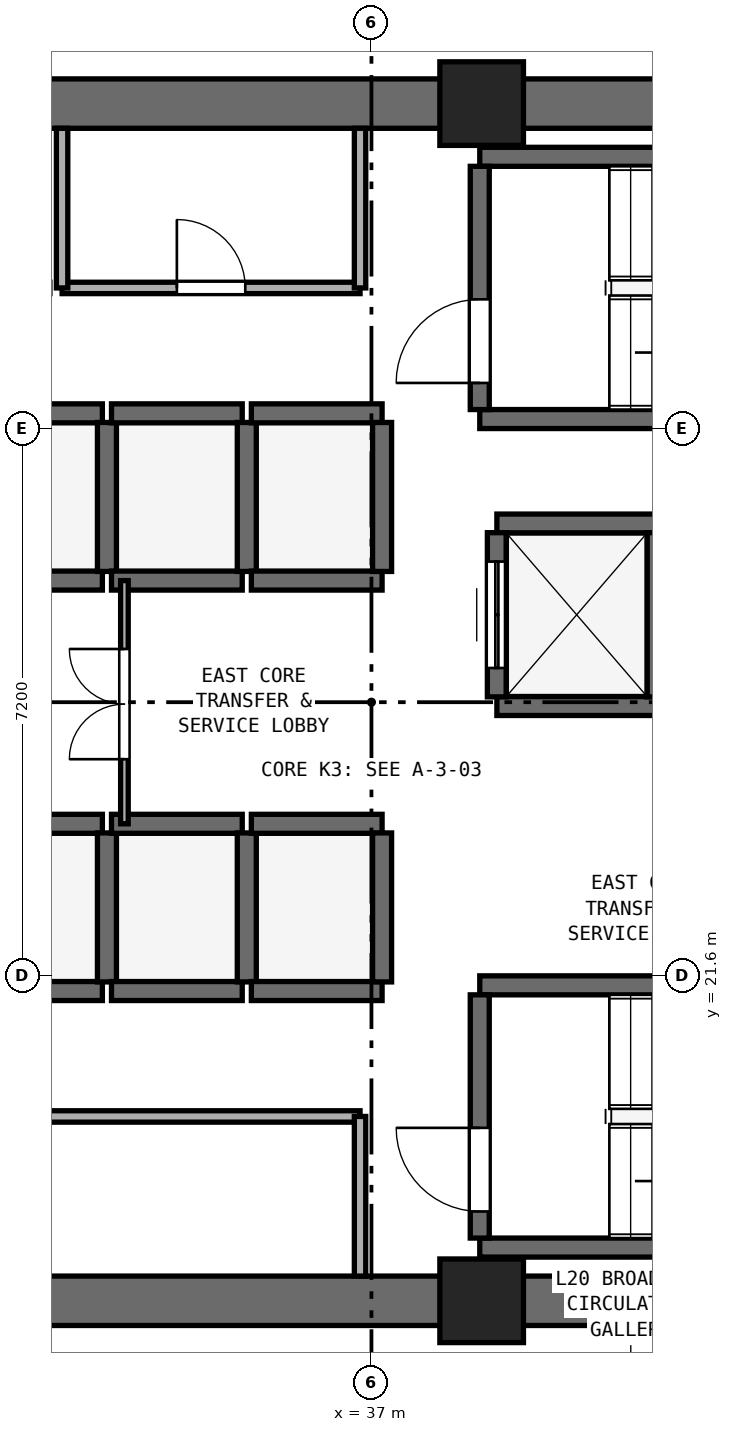
"""IFC4 building model, lengths in metres.
Left out: names, types, materials, properties, quantities, classifications, styles, units other than length and angle.
Written with IfcOpenShell. Run it as: python <this file> out.ifc"""

import sys

from ifc_helpers import new_model, si_unit, direction, frame, frame_2d, origin, origin_2d, place, context, subcontext, project, spatial, rectangle, extrude, element, fill, save


model = new_model("IFC4")
c1 = context("Model", 3, precision=1e-05, world=origin(), true_north=direction((0.0, 1.0)))
c2 = subcontext(c1, "Body", "Model", "MODEL_VIEW")
j1 = project(units=[si_unit("LENGTHUNIT", "METRE"), si_unit("PLANEANGLEUNIT", "RADIAN")], contexts=[c1])
p1 = place(None, origin())
s1 = spatial("IfcSite", under=j1, at=p1, CompositionType="ELEMENT")
p2 = place(p1, origin())
s2 = spatial("IfcBuilding", under=s1, at=p2, CompositionType="ELEMENT")
p3 = place(p2, frame((0.0, 0.0, 82.0)))
s3 = spatial("IfcBuildingStorey", under=s2, at=p3, CompositionType="ELEMENT", Elevation=82.0)
for number, where, z_axis, x_axis in (
    (1, (25.4, 17.325, 0.0), (0.0, 0.0, 1.0), (1.0, 0.0, 0.0)),
    (2, (25.4, 33.075, 0.0), (0.0, 0.0, 1.0), (1.0, 0.0, 0.0)),
):
    element("IfcWall", number, at=place(p3, frame(where, z_axis=z_axis, x_axis=x_axis)), inside=s3, PredefinedType="SHEAR", context=c2, shape_type="SweptSolid", body=[
        extrude(rectangle(XDim=23.2, YDim=0.65, at=frame_2d((11.6, 0.0))), origin(), (0.0, 0.0, 1.0), 3.525),
    ])
for number, where, z_axis, x_axis in (
    (3, (38.45, 17.325, 0.0), (0.0, 0.0, 1.0), (1.0, 0.0, 0.0)),
    (4, (38.45, 33.075, 0.0), (0.0, 0.0, 1.0), (1.0, 0.0, 0.0)),
):
    element("IfcColumn", number, at=place(p3, frame(where, z_axis=z_axis, x_axis=x_axis)), inside=s3, PredefinedType="PILASTER", context=c2, shape_type="SweptSolid", body=[
        extrude(rectangle(XDim=1.1, YDim=1.1, at=origin_2d()), origin(), (0.0, 0.0, 1.0), 3.8),
    ])
for number, where, z_axis, x_axis in (
    (5, (38.425, 28.925, 0.0), (0.0, 0.0, 1.0), (1.0, 0.0, 0.0)),
    (6, (38.425, 32.375, 0.0), (0.0, 0.0, 1.0), (1.0, 0.0, 0.0)),
):
    element("IfcWall", number, at=place(p3, frame(where, z_axis=z_axis, x_axis=x_axis)), inside=s3, PredefinedType="SHEAR", context=c2, shape_type="SweptSolid", body=[
        extrude(rectangle(XDim=7.3, YDim=0.25, at=frame_2d((3.65, 0.0))), origin(), (0.0, 0.0, 1.0), 3.525),
    ])
p4 = place(p3, frame((38.425, 29.05, 0.0), z_axis=(0.0, 0.0, 1.0), x_axis=(0.0, 1.0, 0.0)))
e7 = element("IfcWall", 7, at=p4, inside=s3, PredefinedType="SHEAR", context=c2, shape_type="SweptSolid", body=[
    extrude(rectangle(XDim=3.2, YDim=0.25, at=frame_2d((1.6, 0.0))), origin(), (0.0, 0.0, 1.0), 3.525),
])
p5 = place(p4, frame((0.35, 0.0, 0.0)))
e8 = element("IfcOpeningElement", 8, at=p5, cuts=e7, PredefinedType="OPENING", context=c2, shape_type="SweptSolid", body=[
    extrude(rectangle(XDim=1.1, YDim=2.15, at=frame_2d((0.55, 1.075))), frame((0.0, 0.135, 0.0), z_axis=(0.0, -1.0, 0.0), x_axis=(1.0, 0.0, 0.0)), (0.0, 0.0, 1.0), 0.27),
])
for number, where, z_axis, x_axis in (
    (9, (38.425, 18.025, 0.0), (0.0, 0.0, 1.0), (1.0, 0.0, 0.0)),
    (10, (38.425, 21.475, 0.0), (0.0, 0.0, 1.0), (1.0, 0.0, 0.0)),
):
    element("IfcWall", number, at=place(p3, frame(where, z_axis=z_axis, x_axis=x_axis)), inside=s3, PredefinedType="SHEAR", context=c2, shape_type="SweptSolid", body=[
        extrude(rectangle(XDim=7.3, YDim=0.25, at=frame_2d((3.65, 0.0))), origin(), (0.0, 0.0, 1.0), 3.525),
    ])
p6 = place(p3, frame((38.425, 18.15, 0.0), z_axis=(0.0, 0.0, 1.0), x_axis=(0.0, 1.0, 0.0)))
e11 = element("IfcWall", 11, at=p6, inside=s3, PredefinedType="SHEAR", context=c2, shape_type="SweptSolid", body=[
    extrude(rectangle(XDim=3.2, YDim=0.25, at=frame_2d((1.6, 0.0))), origin(), (0.0, 0.0, 1.0), 3.525),
])
p7 = place(p6, frame((0.35, 0.0, 0.0)))
e12 = element("IfcOpeningElement", 12, at=p7, cuts=e11, PredefinedType="OPENING", context=c2, shape_type="SweptSolid", body=[
    extrude(rectangle(XDim=1.1, YDim=2.15, at=frame_2d((0.55, 1.075))), frame((0.0, 0.135, 0.0), z_axis=(0.0, -1.0, 0.0), x_axis=(1.0, 0.0, 0.0)), (0.0, 0.0, 1.0), 0.27),
])
for number, where, z_axis, x_axis in (
    (13, (31.74, 21.4, 0.0), (0.0, 0.0, 1.0), (1.0, 0.0, 0.0)),
    (14, (31.74, 23.6, 0.0), (0.0, 0.0, 1.0), (1.0, 0.0, 0.0)),
):
    element("IfcWall", number, at=place(p3, frame(where, z_axis=z_axis, x_axis=x_axis)), inside=s3, PredefinedType="SHEAR", context=c2, shape_type="SweptSolid", body=[
        extrude(rectangle(XDim=1.72, YDim=0.25, at=frame_2d((0.86, 0.0))), origin(), (0.0, 0.0, 1.0), 3.525),
    ])
p8 = place(p3, frame((33.52, 21.52, 0.0), z_axis=(0.0, 0.0, 1.0), x_axis=(0.0, 1.0, 0.0)))
e15 = element("IfcWall", 15, at=p8, inside=s3, PredefinedType="SHEAR", context=c2, shape_type="SweptSolid", body=[
    extrude(rectangle(XDim=1.96, YDim=0.25, at=frame_2d((0.98, 0.0))), origin(), (0.0, 0.0, 1.0), 3.525),
])
for number, where, z_axis, x_axis in (
    (16, (33.58, 21.4, 0.0), (0.0, 0.0, 1.0), (1.0, 0.0, 0.0)),
    (17, (33.58, 23.6, 0.0), (0.0, 0.0, 1.0), (1.0, 0.0, 0.0)),
):
    element("IfcWall", number, at=place(p3, frame(where, z_axis=z_axis, x_axis=x_axis)), inside=s3, PredefinedType="SHEAR", context=c2, shape_type="SweptSolid", body=[
        extrude(rectangle(XDim=1.72, YDim=0.25, at=frame_2d((0.86, 0.0))), origin(), (0.0, 0.0, 1.0), 3.525),
    ])
p9 = place(p3, frame((35.36, 21.52, 0.0), z_axis=(0.0, 0.0, 1.0), x_axis=(0.0, 1.0, 0.0)))
e18 = element("IfcWall", 18, at=p9, inside=s3, PredefinedType="SHEAR", context=c2, shape_type="SweptSolid", body=[
    extrude(rectangle(XDim=1.96, YDim=0.25, at=frame_2d((0.98, 0.0))), origin(), (0.0, 0.0, 1.0), 3.525),
])
for number, where, z_axis, x_axis in (
    (19, (35.42, 21.4, 0.0), (0.0, 0.0, 1.0), (1.0, 0.0, 0.0)),
    (20, (35.42, 23.6, 0.0), (0.0, 0.0, 1.0), (1.0, 0.0, 0.0)),
):
    element("IfcWall", number, at=place(p3, frame(where, z_axis=z_axis, x_axis=x_axis)), inside=s3, PredefinedType="SHEAR", context=c2, shape_type="SweptSolid", body=[
        extrude(rectangle(XDim=1.72, YDim=0.25, at=frame_2d((0.86, 0.0))), origin(), (0.0, 0.0, 1.0), 3.525),
    ])
p10 = place(p3, frame((37.14, 21.52, 0.0), z_axis=(0.0, 0.0, 1.0), x_axis=(0.0, 1.0, 0.0)))
e21 = element("IfcWall", 21, at=p10, inside=s3, PredefinedType="SHEAR", context=c2, shape_type="SweptSolid", body=[
    extrude(rectangle(XDim=1.96, YDim=0.25, at=frame_2d((0.98, 0.0))), origin(), (0.0, 0.0, 1.0), 3.525),
])
for number, where, z_axis, x_axis in (
    (22, (31.74, 26.8, 0.0), (0.0, 0.0, 1.0), (1.0, 0.0, 0.0)),
    (23, (31.74, 29.0, 0.0), (0.0, 0.0, 1.0), (1.0, 0.0, 0.0)),
):
    element("IfcWall", number, at=place(p3, frame(where, z_axis=z_axis, x_axis=x_axis)), inside=s3, PredefinedType="SHEAR", context=c2, shape_type="SweptSolid", body=[
        extrude(rectangle(XDim=1.72, YDim=0.25, at=frame_2d((0.86, 0.0))), origin(), (0.0, 0.0, 1.0), 3.525),
    ])
p11 = place(p3, frame((33.52, 26.92, 0.0), z_axis=(0.0, 0.0, 1.0), x_axis=(0.0, 1.0, 0.0)))
e24 = element("IfcWall", 24, at=p11, inside=s3, PredefinedType="SHEAR", context=c2, shape_type="SweptSolid", body=[
    extrude(rectangle(XDim=1.96, YDim=0.25, at=frame_2d((0.98, 0.0))), origin(), (0.0, 0.0, 1.0), 3.525),
])
for number, where, z_axis, x_axis in (
    (25, (33.58, 26.8, 0.0), (0.0, 0.0, 1.0), (1.0, 0.0, 0.0)),
    (26, (33.58, 29.0, 0.0), (0.0, 0.0, 1.0), (1.0, 0.0, 0.0)),
):
    element("IfcWall", number, at=place(p3, frame(where, z_axis=z_axis, x_axis=x_axis)), inside=s3, PredefinedType="SHEAR", context=c2, shape_type="SweptSolid", body=[
        extrude(rectangle(XDim=1.72, YDim=0.25, at=frame_2d((0.86, 0.0))), origin(), (0.0, 0.0, 1.0), 3.525),
    ])
p12 = place(p3, frame((35.36, 26.92, 0.0), z_axis=(0.0, 0.0, 1.0), x_axis=(0.0, 1.0, 0.0)))
e27 = element("IfcWall", 27, at=p12, inside=s3, PredefinedType="SHEAR", context=c2, shape_type="SweptSolid", body=[
    extrude(rectangle(XDim=1.96, YDim=0.25, at=frame_2d((0.98, 0.0))), origin(), (0.0, 0.0, 1.0), 3.525),
])
for number, where, z_axis, x_axis in (
    (28, (35.42, 26.8, 0.0), (0.0, 0.0, 1.0), (1.0, 0.0, 0.0)),
    (29, (35.42, 29.0, 0.0), (0.0, 0.0, 1.0), (1.0, 0.0, 0.0)),
):
    element("IfcWall", number, at=place(p3, frame(where, z_axis=z_axis, x_axis=x_axis)), inside=s3, PredefinedType="SHEAR", context=c2, shape_type="SweptSolid", body=[
        extrude(rectangle(XDim=1.72, YDim=0.25, at=frame_2d((0.86, 0.0))), origin(), (0.0, 0.0, 1.0), 3.525),
    ])
p13 = place(p3, frame((37.14, 26.92, 0.0), z_axis=(0.0, 0.0, 1.0), x_axis=(0.0, 1.0, 0.0)))
e30 = element("IfcWall", 30, at=p13, inside=s3, PredefinedType="SHEAR", context=c2, shape_type="SweptSolid", body=[
    extrude(rectangle(XDim=1.96, YDim=0.25, at=frame_2d((0.98, 0.0))), origin(), (0.0, 0.0, 1.0), 3.525),
])
for number, where, z_axis, x_axis in (
    (31, (38.65, 25.15, 0.0), (0.0, 0.0, 1.0), (1.0, 0.0, 0.0)),
    (32, (38.65, 27.55, 0.0), (0.0, 0.0, 1.0), (1.0, 0.0, 0.0)),
):
    element("IfcWall", number, at=place(p3, frame(where, z_axis=z_axis, x_axis=x_axis)), inside=s3, PredefinedType="SHEAR", context=c2, shape_type="SweptSolid", body=[
        extrude(rectangle(XDim=2.1, YDim=0.25, at=frame_2d((1.05, 0.0))), origin(), (0.0, 0.0, 1.0), 3.525),
    ])
p14 = place(p3, frame((38.65, 25.27, 0.0), z_axis=(0.0, 0.0, 1.0), x_axis=(0.0, 1.0, 0.0)))
e33 = element("IfcWall", 33, at=p14, inside=s3, PredefinedType="SHEAR", context=c2, shape_type="SweptSolid", body=[
    extrude(rectangle(XDim=2.16, YDim=0.25, at=frame_2d((1.08, 0.0))), origin(), (0.0, 0.0, 1.0), 3.525),
])
p15 = place(p14, frame((0.38, 0.0, 0.0)))
e34 = element("IfcOpeningElement", 34, at=p15, cuts=e33, PredefinedType="OPENING", context=c2, shape_type="SweptSolid", body=[
    extrude(rectangle(XDim=1.4, YDim=2.2, at=frame_2d((0.7, 1.1))), frame((0.0, 0.135, 0.0), z_axis=(0.0, -1.0, 0.0), x_axis=(1.0, 0.0, 0.0)), (0.0, 0.0, 1.0), 0.27),
])
p16 = place(p3, frame((40.75, 25.27, 0.0), z_axis=(0.0, 0.0, 1.0), x_axis=(0.0, 1.0, 0.0)))
e35 = element("IfcWall", 35, at=p16, inside=s3, PredefinedType="SHEAR", context=c2, shape_type="SweptSolid", body=[
    extrude(rectangle(XDim=2.16, YDim=0.25, at=frame_2d((1.08, 0.0))), origin(), (0.0, 0.0, 1.0), 3.525),
])
p17 = place(p3, frame((32.93, 30.65, 0.0), z_axis=(0.0, 0.0, 1.0), x_axis=(1.0, 0.0, 0.0)))
e36 = element("IfcWall", 36, at=p17, inside=s3, PredefinedType="PARTITIONING", context=c2, shape_type="SweptSolid", body=[
    extrude(rectangle(XDim=3.92, YDim=0.15, at=frame_2d((1.96, 0.0))), origin(), (0.0, 0.0, 1.0), 3.525),
])
p18 = place(p17, frame((1.51, 0.0, 0.0)))
e37 = element("IfcOpeningElement", 37, at=p18, cuts=e36, PredefinedType="OPENING", context=c2, shape_type="SweptSolid", body=[
    extrude(rectangle(XDim=0.9, YDim=2.1, at=frame_2d((0.45, 1.05))), frame((0.0, 0.085, 0.0), z_axis=(0.0, -1.0, 0.0), x_axis=(1.0, 0.0, 0.0)), (0.0, 0.0, 1.0), 0.17),
])
for number, where, z_axis, x_axis in (
    (38, (32.93, 30.65, 0.0), (0.0, 0.0, 1.0), (0.0, 1.0, 0.0)),
    (39, (36.85, 30.65, 0.0), (0.0, 0.0, 1.0), (0.0, 1.0, 0.0)),
):
    element("IfcWall", number, at=place(p3, frame(where, z_axis=z_axis, x_axis=x_axis)), inside=s3, PredefinedType="PARTITIONING", context=c2, shape_type="SweptSolid", body=[
        extrude(rectangle(XDim=2.1, YDim=0.15, at=frame_2d((1.05, 0.0))), origin(), (0.0, 0.0, 1.0), 3.525),
    ])
p19 = place(p3, frame((26.17, 19.75, 0.0), z_axis=(0.0, 0.0, 1.0), x_axis=(1.0, 0.0, 0.0)))
e40 = element("IfcWall", 40, at=p19, inside=s3, PredefinedType="PARTITIONING", context=c2, shape_type="SweptSolid", body=[
    extrude(rectangle(XDim=10.68, YDim=0.15, at=frame_2d((5.34, 0.0))), origin(), (0.0, 0.0, 1.0), 3.525),
])
p20 = place(p19, frame((4.865, 0.0, 0.0)))
e41 = element("IfcOpeningElement", 41, at=p20, cuts=e40, PredefinedType="OPENING", context=c2, shape_type="SweptSolid", body=[
    extrude(rectangle(XDim=0.95, YDim=2.1, at=frame_2d((0.475, 1.05))), frame((0.0, 0.085, 0.0), z_axis=(0.0, -1.0, 0.0), x_axis=(1.0, 0.0, 0.0)), (0.0, 0.0, 1.0), 0.17),
])
p21 = place(p3, frame((36.85, 17.65, 0.0), z_axis=(0.0, 0.0, 1.0), x_axis=(0.0, 1.0, 0.0)))
e42 = element("IfcWall", 42, at=p21, inside=s3, PredefinedType="PARTITIONING", context=c2, shape_type="SweptSolid", body=[
    extrude(rectangle(XDim=2.1, YDim=0.15, at=frame_2d((1.05, 0.0))), origin(), (0.0, 0.0, 1.0), 3.525),
])
p22 = place(p3, frame((33.75, 23.6, 0.0), z_axis=(0.0, 0.0, 1.0), x_axis=(0.0, 1.0, 0.0)))
e43 = element("IfcWall", 43, at=p22, inside=s3, PredefinedType="PARTITIONING", context=c2, shape_type="SweptSolid", body=[
    extrude(rectangle(XDim=3.2, YDim=0.1, at=frame_2d((1.6, 0.0))), origin(), (0.0, 0.0, 1.0), 3.525),
])
p23 = place(p22, frame((0.85, 0.0, 0.0)))
e44 = element("IfcOpeningElement", 44, at=p23, cuts=e43, PredefinedType="OPENING", context=c2, shape_type="SweptSolid", body=[
    extrude(rectangle(XDim=1.45, YDim=2.12, at=frame_2d((0.725, 1.06))), frame((0.0, 0.06, 0.0), z_axis=(0.0, -1.0, 0.0), x_axis=(1.0, 0.0, 0.0)), (0.0, 0.0, 1.0), 0.12),
])
p24 = place(p5, origin())
e45 = element("IfcDoor", 45, at=p24, inside=s3, OperationType="SINGLE_SWING_LEFT", PredefinedType="DOOR", context=c2, shape_type="SweptSolid", body=[
    extrude(rectangle(XDim=1.1, YDim=2.15, at=frame_2d((0.55, 1.075))), frame((0.0, 0.025, 0.0), z_axis=(0.0, -1.0, 0.0), x_axis=(1.0, 0.0, 0.0)), (0.0, 0.0, 1.0), 0.05),
])
fill(e8, e45)
p25 = place(p7, origin())
e46 = element("IfcDoor", 46, at=p25, inside=s3, OperationType="SINGLE_SWING_RIGHT", PredefinedType="DOOR", context=c2, shape_type="SweptSolid", body=[
    extrude(rectangle(XDim=1.1, YDim=2.15, at=frame_2d((0.55, 1.075))), frame((0.0, 0.025, 0.0), z_axis=(0.0, -1.0, 0.0), x_axis=(1.0, 0.0, 0.0)), (0.0, 0.0, 1.0), 0.05),
])
fill(e12, e46)
p26 = place(p15, origin())
e47 = element("IfcDoor", 47, at=p26, inside=s3, OperationType="DOUBLE_DOOR_SLIDING", PredefinedType="DOOR", context=c2, shape_type="SweptSolid", body=[
    extrude(rectangle(XDim=1.4, YDim=2.2, at=frame_2d((0.7, 1.1))), frame((0.0, 0.025, 0.0), z_axis=(0.0, -1.0, 0.0), x_axis=(1.0, 0.0, 0.0)), (0.0, 0.0, 1.0), 0.05),
])
fill(e34, e47)
p27 = place(p18, origin())
e48 = element("IfcDoor", 48, at=p27, inside=s3, OperationType="SINGLE_SWING_LEFT", PredefinedType="DOOR", context=c2, shape_type="SweptSolid", body=[
    extrude(rectangle(XDim=0.9, YDim=2.1, at=frame_2d((0.45, 1.05))), frame((0.0, 0.025, 0.0), z_axis=(0.0, -1.0, 0.0), x_axis=(1.0, 0.0, 0.0)), (0.0, 0.0, 1.0), 0.05),
])
fill(e37, e48)
p28 = place(p23, origin())
e49 = element("IfcDoor", 49, at=p28, inside=s3, OperationType="DOUBLE_DOOR_SINGLE_SWING", PredefinedType="DOOR", context=c2, shape_type="SweptSolid", body=[
    extrude(rectangle(XDim=1.45, YDim=2.12, at=frame_2d((0.725, 1.06))), frame((0.0, 0.025, 0.0), z_axis=(0.0, -1.0, 0.0), x_axis=(1.0, 0.0, 0.0)), (0.0, 0.0, 1.0), 0.05),
])
fill(e44, e49)
save(model, sys.argv[1])
